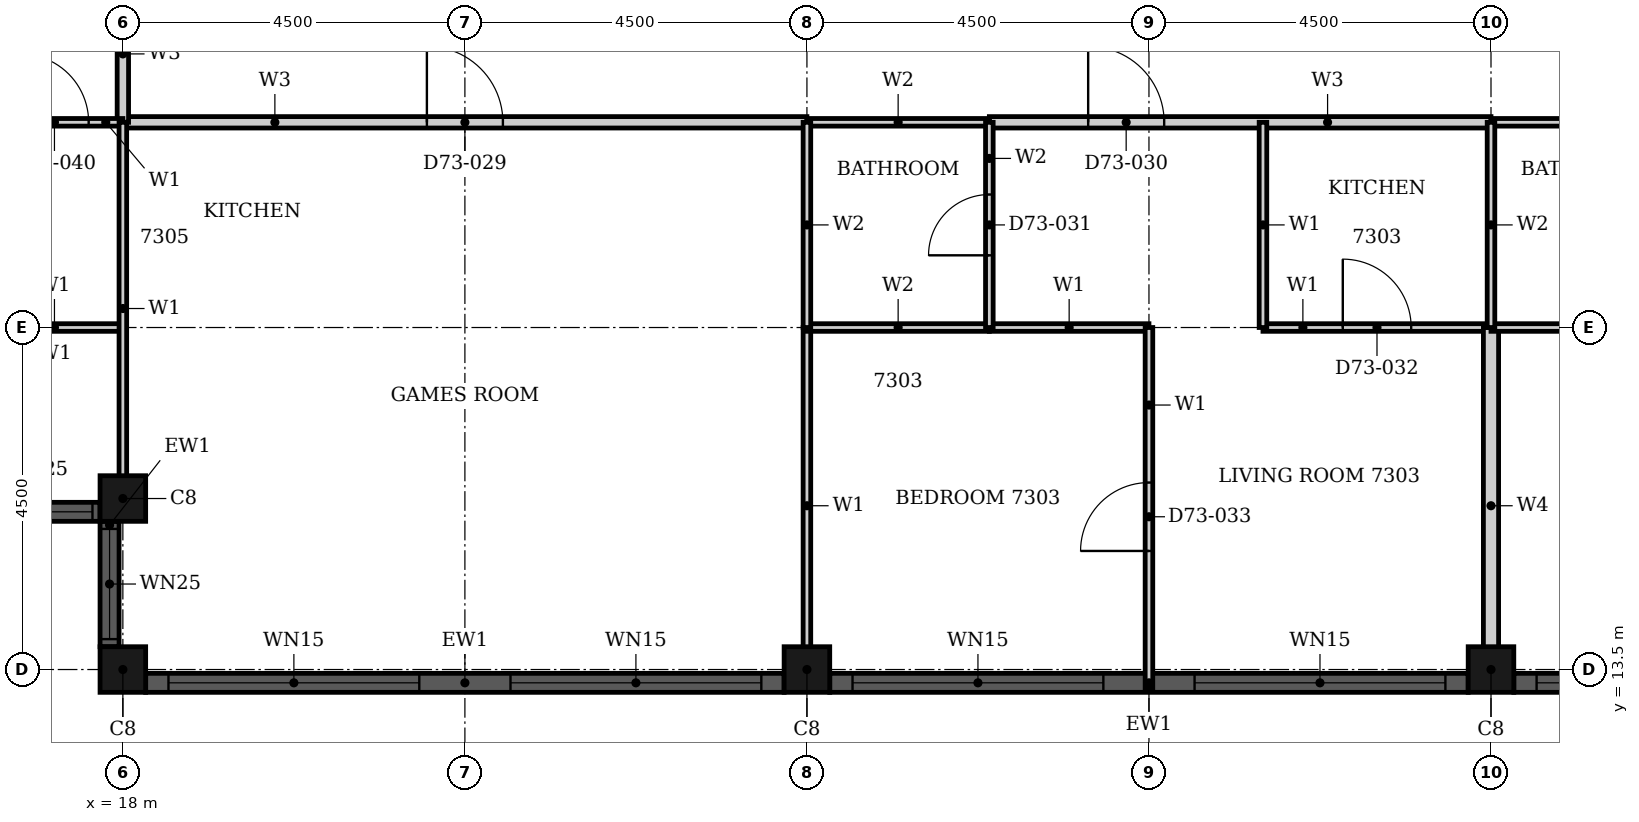
"""IFC4 building model, lengths in metres.
Left out: names, types, materials, properties, quantities, classifications, styles, units other than length and angle.
Written with IfcOpenShell. Run it as: python <this file> out.ifc"""

import sys

from ifc_helpers import new_model, si_unit, direction, frame, frame_2d, origin, origin_2d, place, context, subcontext, project, spatial, rectangle, hollow_rectangle, extrude, element, fill, save


model = new_model("IFC4")
c1 = context("Model", 3, precision=1e-05, world=origin(), true_north=direction((0.0, 1.0)))
c2 = subcontext(c1, "Body", "Model", "MODEL_VIEW")
j1 = project(units=[si_unit("LENGTHUNIT", "METRE"), si_unit("PLANEANGLEUNIT", "RADIAN")], contexts=[c1])
p1 = place(None, origin())
s1 = spatial("IfcSite", under=j1, at=p1, CompositionType="ELEMENT")
p2 = place(p1, origin())
s2 = spatial("IfcBuilding", under=s1, at=p2, CompositionType="ELEMENT")
p3 = place(p2, frame((0.0, 0.0, 287.1)))
s3 = spatial("IfcBuildingStorey", under=s2, at=p3, CompositionType="ELEMENT", Elevation=287.1)
for number, where, z_axis, x_axis in (
    (1, (18.0, 15.75, 0.0), (0.0, 0.0, 1.0), (1.0, 0.0, 0.0)),
    (2, (18.0, 13.5, 0.0), (0.0, 0.0, 1.0), (1.0, 0.0, 0.0)),
    (3, (27.0, 13.5, 0.0), (0.0, 0.0, 1.0), (1.0, 0.0, 0.0)),
    (4, (36.0, 13.5, 0.0), (0.0, 0.0, 1.0), (1.0, 0.0, 0.0)),
):
    element("IfcColumn", number, at=place(p3, frame(where, z_axis=z_axis, x_axis=x_axis)), inside=s3, PredefinedType="COLUMN", context=c2, shape_type="SweptSolid", body=[
        extrude(hollow_rectangle(XDim=0.6, YDim=0.6, WallThickness=0.02, at=origin_2d()), origin(), (0.0, 0.0, 1.0), 3.7),
    ])
p4 = place(p3, frame((16.05, 15.575, 0.0), z_axis=(0.0, 0.0, 1.0), x_axis=(1.0, 0.0, 0.0)))
e5 = element("IfcWall", 5, at=p4, inside=s3, PredefinedType="SOLIDWALL", context=c2, shape_type="SweptSolid", body=[
    extrude(rectangle(XDim=1.65, YDim=0.25, at=frame_2d((0.825, 0.0))), origin(), (0.0, 0.0, 1.0), 3.7),
])
p5 = place(p4, frame((0.1, 0.0, 0.9)))
e6 = element("IfcOpeningElement", 6, at=p5, cuts=e5, PredefinedType="OPENING", context=c2, shape_type="SweptSolid", body=[
    extrude(rectangle(XDim=1.45, YDim=1.85, at=frame_2d((0.725, 0.925))), frame((0.0, 0.135, 0.0), z_axis=(0.0, -1.0, 0.0), x_axis=(1.0, 0.0, 0.0)), (0.0, 0.0, 1.0), 0.27),
])
p6 = place(p3, frame((17.825, 15.45, 0.0), z_axis=(0.0, 0.0, 1.0), x_axis=(0.0, -1.0, 0.0)))
e7 = element("IfcWall", 7, at=p6, inside=s3, PredefinedType="SOLIDWALL", context=c2, shape_type="SweptSolid", body=[
    extrude(rectangle(XDim=1.65, YDim=0.25, at=frame_2d((0.825, 0.0))), origin(), (0.0, 0.0, 1.0), 3.7),
])
p7 = place(p6, frame((0.1, 0.0, 0.9)))
e8 = element("IfcOpeningElement", 8, at=p7, cuts=e7, PredefinedType="OPENING", context=c2, shape_type="SweptSolid", body=[
    extrude(rectangle(XDim=1.45, YDim=1.85, at=frame_2d((0.725, 0.925))), frame((0.0, 0.135, 0.0), z_axis=(0.0, -1.0, 0.0), x_axis=(1.0, 0.0, 0.0)), (0.0, 0.0, 1.0), 0.27),
])
p8 = place(p3, frame((18.3, 13.325, 0.0), z_axis=(0.0, 0.0, 1.0), x_axis=(1.0, 0.0, 0.0)))
e9 = element("IfcWall", 9, at=p8, inside=s3, PredefinedType="SOLIDWALL", context=c2, shape_type="SweptSolid", body=[
    extrude(rectangle(XDim=8.4, YDim=0.25, at=frame_2d((4.2, 0.0))), origin(), (0.0, 0.0, 1.0), 3.7),
])
p9 = place(p8, frame((0.3, 0.0, 0.45)))
e10 = element("IfcOpeningElement", 10, at=p9, cuts=e9, PredefinedType="OPENING", context=c2, shape_type="SweptSolid", body=[
    extrude(rectangle(XDim=3.3, YDim=2.3, at=frame_2d((1.65, 1.15))), frame((0.0, 0.135, 0.0), z_axis=(0.0, -1.0, 0.0), x_axis=(1.0, 0.0, 0.0)), (0.0, 0.0, 1.0), 0.27),
])
p10 = place(p8, frame((4.8, 0.0, 0.45)))
e11 = element("IfcOpeningElement", 11, at=p10, cuts=e9, PredefinedType="OPENING", context=c2, shape_type="SweptSolid", body=[
    extrude(rectangle(XDim=3.3, YDim=2.3, at=frame_2d((1.65, 1.15))), frame((0.0, 0.135, 0.0), z_axis=(0.0, -1.0, 0.0), x_axis=(1.0, 0.0, 0.0)), (0.0, 0.0, 1.0), 0.27),
])
p11 = place(p3, frame((27.3, 13.325, 0.0), z_axis=(0.0, 0.0, 1.0), x_axis=(1.0, 0.0, 0.0)))
e12 = element("IfcWall", 12, at=p11, inside=s3, PredefinedType="SOLIDWALL", context=c2, shape_type="SweptSolid", body=[
    extrude(rectangle(XDim=8.4, YDim=0.25, at=frame_2d((4.2, 0.0))), origin(), (0.0, 0.0, 1.0), 3.7),
])
p12 = place(p11, frame((0.3, 0.0, 0.45)))
e13 = element("IfcOpeningElement", 13, at=p12, cuts=e12, PredefinedType="OPENING", context=c2, shape_type="SweptSolid", body=[
    extrude(rectangle(XDim=3.3, YDim=2.3, at=frame_2d((1.65, 1.15))), frame((0.0, 0.135, 0.0), z_axis=(0.0, -1.0, 0.0), x_axis=(1.0, 0.0, 0.0)), (0.0, 0.0, 1.0), 0.27),
])
p13 = place(p11, frame((4.8, 0.0, 0.45)))
e14 = element("IfcOpeningElement", 14, at=p13, cuts=e12, PredefinedType="OPENING", context=c2, shape_type="SweptSolid", body=[
    extrude(rectangle(XDim=3.3, YDim=2.3, at=frame_2d((1.65, 1.15))), frame((0.0, 0.135, 0.0), z_axis=(0.0, -1.0, 0.0), x_axis=(1.0, 0.0, 0.0)), (0.0, 0.0, 1.0), 0.27),
])
p14 = place(p3, frame((36.3, 13.325, 0.0), z_axis=(0.0, 0.0, 1.0), x_axis=(1.0, 0.0, 0.0)))
e15 = element("IfcWall", 15, at=p14, inside=s3, PredefinedType="SOLIDWALL", context=c2, shape_type="SweptSolid", body=[
    extrude(rectangle(XDim=8.4, YDim=0.25, at=frame_2d((4.2, 0.0))), origin(), (0.0, 0.0, 1.0), 3.7),
])
p15 = place(p14, frame((0.3, 0.0, 0.45)))
e16 = element("IfcOpeningElement", 16, at=p15, cuts=e15, PredefinedType="OPENING", context=c2, shape_type="SweptSolid", body=[
    extrude(rectangle(XDim=3.3, YDim=2.3, at=frame_2d((1.65, 1.15))), frame((0.0, 0.135, 0.0), z_axis=(0.0, -1.0, 0.0), x_axis=(1.0, 0.0, 0.0)), (0.0, 0.0, 1.0), 0.27),
])
p16 = place(p14, frame((4.8, 0.0, 0.45)))
e17 = element("IfcOpeningElement", 17, at=p16, cuts=e15, PredefinedType="OPENING", context=c2, shape_type="SweptSolid", body=[
    extrude(rectangle(XDim=3.3, YDim=2.3, at=frame_2d((1.65, 1.15))), frame((0.0, 0.135, 0.0), z_axis=(0.0, -1.0, 0.0), x_axis=(1.0, 0.0, 0.0)), (0.0, 0.0, 1.0), 0.27),
])
p17 = place(p3, frame((18.0, 20.7, 0.0), z_axis=(0.0, 0.0, 1.0), x_axis=(1.0, 0.0, 0.0)))
e18 = element("IfcWall", 18, at=p17, inside=s3, PredefinedType="PARTITIONING", context=c2, shape_type="SweptSolid", body=[
    extrude(rectangle(XDim=9.0, YDim=0.15, at=frame_2d((4.5, 0.0))), origin(), (0.0, 0.0, 1.0), 3.4),
])
p18 = place(p17, frame((4.0, 0.0, 0.0)))
e19 = element("IfcOpeningElement", 19, at=p18, cuts=e18, PredefinedType="OPENING", context=c2, shape_type="SweptSolid", body=[
    extrude(rectangle(XDim=1.0, YDim=2.1, at=frame_2d((0.5, 1.05))), frame((0.0, 0.085, 0.0), z_axis=(0.0, -1.0, 0.0), x_axis=(1.0, 0.0, 0.0)), (0.0, 0.0, 1.0), 0.17),
])
p19 = place(p3, frame((29.4, 20.7, 0.0), z_axis=(0.0, 0.0, 1.0), x_axis=(1.0, 0.0, 0.0)))
e20 = element("IfcWall", 20, at=p19, inside=s3, PredefinedType="PARTITIONING", context=c2, shape_type="SweptSolid", body=[
    extrude(rectangle(XDim=6.6, YDim=0.15, at=frame_2d((3.3, 0.0))), origin(), (0.0, 0.0, 1.0), 3.4),
])
p20 = place(p19, frame((1.3, 0.0, 0.0)))
e21 = element("IfcOpeningElement", 21, at=p20, cuts=e20, PredefinedType="OPENING", context=c2, shape_type="SweptSolid", body=[
    extrude(rectangle(XDim=1.0, YDim=2.2, at=frame_2d((0.5, 1.1))), frame((0.0, 0.085, 0.0), z_axis=(0.0, -1.0, 0.0), x_axis=(1.0, 0.0, 0.0)), (0.0, 0.0, 1.0), 0.17),
])
p21 = place(p3, frame((18.0, 20.7, 0.0), z_axis=(0.0, 0.0, 1.0), x_axis=(0.0, 1.0, 0.0)))
e22 = element("IfcWall", 22, at=p21, inside=s3, PredefinedType="PARTITIONING", context=c2, shape_type="SweptSolid", body=[
    extrude(rectangle(XDim=1.8, YDim=0.15, at=frame_2d((0.9, 0.0))), origin(), (0.0, 0.0, 1.0), 3.4),
])
p22 = place(p3, frame((29.4, 18.0, 0.0), z_axis=(0.0, 0.0, 1.0), x_axis=(1.0, 0.0, 0.0)))
e23 = element("IfcWall", 23, at=p22, inside=s3, PredefinedType="PARTITIONING", context=c2, shape_type="SweptSolid", body=[
    extrude(rectangle(XDim=2.1, YDim=0.1, at=frame_2d((1.05, 0.0))), origin(), (0.0, 0.0, 1.0), 3.4),
])
p23 = place(p3, frame((33.0, 18.0, 0.0), z_axis=(0.0, 0.0, 1.0), x_axis=(1.0, 0.0, 0.0)))
e24 = element("IfcWall", 24, at=p23, inside=s3, PredefinedType="PARTITIONING", context=c2, shape_type="SweptSolid", body=[
    extrude(rectangle(XDim=3.0, YDim=0.1, at=frame_2d((1.5, 0.0))), origin(), (0.0, 0.0, 1.0), 3.4),
])
p24 = place(p23, frame((1.05, 0.0, 0.0)))
e25 = element("IfcOpeningElement", 25, at=p24, cuts=e24, PredefinedType="OPENING", context=c2, shape_type="SweptSolid", body=[
    extrude(rectangle(XDim=0.9, YDim=2.1, at=frame_2d((0.45, 1.05))), frame((0.0, 0.06, 0.0), z_axis=(0.0, -1.0, 0.0), x_axis=(1.0, 0.0, 0.0)), (0.0, 0.0, 1.0), 0.12),
])
p25 = place(p3, frame((16.2, 18.0, 0.0), z_axis=(0.0, 0.0, 1.0), x_axis=(1.0, 0.0, 0.0)))
e26 = element("IfcWall", 26, at=p25, inside=s3, PredefinedType="PARTITIONING", context=c2, shape_type="SweptSolid", body=[
    extrude(rectangle(XDim=1.8, YDim=0.1, at=frame_2d((0.9, 0.0))), origin(), (0.0, 0.0, 1.0), 3.4),
])
p26 = place(p3, frame((16.2, 20.7, 0.0), z_axis=(0.0, 0.0, 1.0), x_axis=(1.0, 0.0, 0.0)))
e27 = element("IfcWall", 27, at=p26, inside=s3, PredefinedType="PARTITIONING", context=c2, shape_type="SweptSolid", body=[
    extrude(rectangle(XDim=1.8, YDim=0.1, at=frame_2d((0.9, 0.0))), origin(), (0.0, 0.0, 1.0), 3.4),
])
p27 = place(p26, frame((0.45, 0.0, 0.0)))
e28 = element("IfcOpeningElement", 28, at=p27, cuts=e27, PredefinedType="OPENING", context=c2, shape_type="SweptSolid", body=[
    extrude(rectangle(XDim=0.9, YDim=2.1, at=frame_2d((0.45, 1.05))), frame((0.0, 0.06, 0.0), z_axis=(0.0, -1.0, 0.0), x_axis=(1.0, 0.0, 0.0)), (0.0, 0.0, 1.0), 0.12),
])
p28 = place(p3, frame((18.0, 15.8, 0.0), z_axis=(0.0, 0.0, 1.0), x_axis=(0.0, 1.0, 0.0)))
e29 = element("IfcWall", 29, at=p28, inside=s3, PredefinedType="PARTITIONING", context=c2, shape_type="SweptSolid", body=[
    extrude(rectangle(XDim=4.9, YDim=0.1, at=frame_2d((2.45, 0.0))), origin(), (0.0, 0.0, 1.0), 3.4),
])
p29 = place(p3, frame((27.0, 13.31, 0.0), z_axis=(0.0, 0.0, 1.0), x_axis=(0.0, 1.0, 0.0)))
e30 = element("IfcWall", 30, at=p29, inside=s3, PredefinedType="PARTITIONING", context=c2, shape_type="SweptSolid", body=[
    extrude(rectangle(XDim=4.69, YDim=0.1, at=frame_2d((2.345, 0.0))), origin(), (0.0, 0.0, 1.0), 3.4),
])
p30 = place(p3, frame((31.5, 13.26, 0.0), z_axis=(0.0, 0.0, 1.0), x_axis=(0.0, 1.0, 0.0)))
e31 = element("IfcWall", 31, at=p30, inside=s3, PredefinedType="PARTITIONING", context=c2, shape_type="SweptSolid", body=[
    extrude(rectangle(XDim=4.74, YDim=0.1, at=frame_2d((2.37, 0.0))), origin(), (0.0, 0.0, 1.0), 3.4),
])
p31 = place(p30, frame((1.8, 0.0, 0.0)))
e32 = element("IfcOpeningElement", 32, at=p31, cuts=e31, PredefinedType="OPENING", context=c2, shape_type="SweptSolid", body=[
    extrude(rectangle(XDim=0.9, YDim=2.1, at=frame_2d((0.45, 1.05))), frame((0.0, 0.06, 0.0), z_axis=(0.0, -1.0, 0.0), x_axis=(1.0, 0.0, 0.0)), (0.0, 0.0, 1.0), 0.12),
])
p32 = place(p3, frame((33.0, 18.0, 0.0), z_axis=(0.0, 0.0, 1.0), x_axis=(0.0, 1.0, 0.0)))
e33 = element("IfcWall", 33, at=p32, inside=s3, PredefinedType="PARTITIONING", context=c2, shape_type="SweptSolid", body=[
    extrude(rectangle(XDim=2.7, YDim=0.1, at=frame_2d((1.35, 0.0))), origin(), (0.0, 0.0, 1.0), 3.4),
])
p33 = place(p3, frame((36.0, 13.31, 0.0), z_axis=(0.0, 0.0, 1.0), x_axis=(0.0, 1.0, 0.0)))
e34 = element("IfcWall", 34, at=p33, inside=s3, PredefinedType="PARTITIONING", context=c2, shape_type="SweptSolid", body=[
    extrude(rectangle(XDim=4.69, YDim=0.2, at=frame_2d((2.345, 0.0))), origin(), (0.0, 0.0, 1.0), 3.4),
])
for number, where, z_axis, x_axis in (
    (35, (27.0, 18.0, 0.0), (0.0, 0.0, 1.0), (1.0, 0.0, 0.0)),
    (36, (36.0, 18.0, 0.0), (0.0, 0.0, 1.0), (1.0, 0.0, 0.0)),
    (37, (27.0, 20.7, 0.0), (0.0, 0.0, 1.0), (1.0, 0.0, 0.0)),
    (38, (36.0, 20.7, 0.0), (0.0, 0.0, 1.0), (1.0, 0.0, 0.0)),
):
    element("IfcWall", number, at=place(p3, frame(where, z_axis=z_axis, x_axis=x_axis)), inside=s3, PredefinedType="PARTITIONING", context=c2, shape_type="SweptSolid", body=[
        extrude(rectangle(XDim=2.4, YDim=0.1, at=frame_2d((1.2, 0.0))), origin(), (0.0, 0.0, 1.0), 3.4),
    ])
p34 = place(p3, frame((27.0, 18.0, 0.0), z_axis=(0.0, 0.0, 1.0), x_axis=(0.0, 1.0, 0.0)))
e39 = element("IfcWall", 39, at=p34, inside=s3, PredefinedType="PARTITIONING", context=c2, shape_type="SweptSolid", body=[
    extrude(rectangle(XDim=2.7, YDim=0.1, at=frame_2d((1.35, 0.0))), origin(), (0.0, 0.0, 1.0), 3.4),
])
p35 = place(p3, frame((29.4, 18.0, 0.0), z_axis=(0.0, 0.0, 1.0), x_axis=(0.0, 1.0, 0.0)))
e40 = element("IfcWall", 40, at=p35, inside=s3, PredefinedType="PARTITIONING", context=c2, shape_type="SweptSolid", body=[
    extrude(rectangle(XDim=2.7, YDim=0.1, at=frame_2d((1.35, 0.0))), origin(), (0.0, 0.0, 1.0), 3.4),
])
p36 = place(p35, frame((0.95, 0.0, 0.0)))
e41 = element("IfcOpeningElement", 41, at=p36, cuts=e40, PredefinedType="OPENING", context=c2, shape_type="SweptSolid", body=[
    extrude(rectangle(XDim=0.8, YDim=2.1, at=frame_2d((0.4, 1.05))), frame((0.0, 0.06, 0.0), z_axis=(0.0, -1.0, 0.0), x_axis=(1.0, 0.0, 0.0)), (0.0, 0.0, 1.0), 0.12),
])
p37 = place(p3, frame((36.0, 18.0, 0.0), z_axis=(0.0, 0.0, 1.0), x_axis=(0.0, 1.0, 0.0)))
e42 = element("IfcWall", 42, at=p37, inside=s3, PredefinedType="PARTITIONING", context=c2, shape_type="SweptSolid", body=[
    extrude(rectangle(XDim=2.7, YDim=0.1, at=frame_2d((1.35, 0.0))), origin(), (0.0, 0.0, 1.0), 3.4),
])
p38 = place(p5, origin())
e43 = element("IfcWindow", 43, at=p38, inside=s3, PartitioningType="SINGLE_PANEL", PredefinedType="WINDOW", context=c2, shape_type="SweptSolid", body=[
    extrude(rectangle(XDim=1.45, YDim=1.85, at=frame_2d((0.725, 0.925))), frame((0.0, 0.03, 0.0), z_axis=(0.0, -1.0, 0.0), x_axis=(1.0, 0.0, 0.0)), (0.0, 0.0, 1.0), 0.06),
])
fill(e6, e43)
p39 = place(p7, origin())
e44 = element("IfcWindow", 44, at=p39, inside=s3, PartitioningType="SINGLE_PANEL", PredefinedType="WINDOW", context=c2, shape_type="SweptSolid", body=[
    extrude(rectangle(XDim=1.45, YDim=1.85, at=frame_2d((0.725, 0.925))), frame((0.0, 0.03, 0.0), z_axis=(0.0, -1.0, 0.0), x_axis=(1.0, 0.0, 0.0)), (0.0, 0.0, 1.0), 0.06),
])
fill(e8, e44)
p40 = place(p9, origin())
e45 = element("IfcWindow", 45, at=p40, inside=s3, PartitioningType="SINGLE_PANEL", PredefinedType="WINDOW", context=c2, shape_type="SweptSolid", body=[
    extrude(rectangle(XDim=3.3, YDim=2.3, at=frame_2d((1.65, 1.15))), frame((0.0, 0.03, 0.0), z_axis=(0.0, -1.0, 0.0), x_axis=(1.0, 0.0, 0.0)), (0.0, 0.0, 1.0), 0.06),
])
fill(e10, e45)
p41 = place(p10, origin())
e46 = element("IfcWindow", 46, at=p41, inside=s3, PartitioningType="SINGLE_PANEL", PredefinedType="WINDOW", context=c2, shape_type="SweptSolid", body=[
    extrude(rectangle(XDim=3.3, YDim=2.3, at=frame_2d((1.65, 1.15))), frame((0.0, 0.03, 0.0), z_axis=(0.0, -1.0, 0.0), x_axis=(1.0, 0.0, 0.0)), (0.0, 0.0, 1.0), 0.06),
])
fill(e11, e46)
p42 = place(p12, origin())
e47 = element("IfcWindow", 47, at=p42, inside=s3, PartitioningType="SINGLE_PANEL", PredefinedType="WINDOW", context=c2, shape_type="SweptSolid", body=[
    extrude(rectangle(XDim=3.3, YDim=2.3, at=frame_2d((1.65, 1.15))), frame((0.0, 0.03, 0.0), z_axis=(0.0, -1.0, 0.0), x_axis=(1.0, 0.0, 0.0)), (0.0, 0.0, 1.0), 0.06),
])
fill(e13, e47)
p43 = place(p13, origin())
e48 = element("IfcWindow", 48, at=p43, inside=s3, PartitioningType="SINGLE_PANEL", PredefinedType="WINDOW", context=c2, shape_type="SweptSolid", body=[
    extrude(rectangle(XDim=3.3, YDim=2.3, at=frame_2d((1.65, 1.15))), frame((0.0, 0.03, 0.0), z_axis=(0.0, -1.0, 0.0), x_axis=(1.0, 0.0, 0.0)), (0.0, 0.0, 1.0), 0.06),
])
fill(e14, e48)
p44 = place(p15, origin())
e49 = element("IfcWindow", 49, at=p44, inside=s3, PartitioningType="SINGLE_PANEL", PredefinedType="WINDOW", context=c2, shape_type="SweptSolid", body=[
    extrude(rectangle(XDim=3.3, YDim=2.3, at=frame_2d((1.65, 1.15))), frame((0.0, 0.03, 0.0), z_axis=(0.0, -1.0, 0.0), x_axis=(1.0, 0.0, 0.0)), (0.0, 0.0, 1.0), 0.06),
])
fill(e16, e49)
p45 = place(p18, origin())
e50 = element("IfcDoor", 50, at=p45, inside=s3, OperationType="SINGLE_SWING_LEFT", PredefinedType="DOOR", context=c2, shape_type="SweptSolid", body=[
    extrude(rectangle(XDim=1.0, YDim=2.1, at=frame_2d((0.5, 1.05))), frame((0.0, 0.025, 0.0), z_axis=(0.0, -1.0, 0.0), x_axis=(1.0, 0.0, 0.0)), (0.0, 0.0, 1.0), 0.05),
])
fill(e19, e50)
p46 = place(p20, origin())
e51 = element("IfcDoor", 51, at=p46, inside=s3, OperationType="SINGLE_SWING_RIGHT", PredefinedType="DOOR", context=c2, shape_type="SweptSolid", body=[
    extrude(rectangle(XDim=1.0, YDim=2.2, at=frame_2d((0.5, 1.1))), frame((0.0, 0.025, 0.0), z_axis=(0.0, -1.0, 0.0), x_axis=(1.0, 0.0, 0.0)), (0.0, 0.0, 1.0), 0.05),
])
fill(e21, e51)
p47 = place(p36, origin())
e52 = element("IfcDoor", 52, at=p47, inside=s3, OperationType="SINGLE_SWING_LEFT", PredefinedType="DOOR", context=c2, shape_type="SweptSolid", body=[
    extrude(rectangle(XDim=0.8, YDim=2.1, at=frame_2d((0.4, 1.05))), frame((0.0, 0.025, 0.0), z_axis=(0.0, -1.0, 0.0), x_axis=(1.0, 0.0, 0.0)), (0.0, 0.0, 1.0), 0.05),
])
fill(e41, e52)
p48 = place(p24, origin())
e53 = element("IfcDoor", 53, at=p48, inside=s3, OperationType="SINGLE_SWING_LEFT", PredefinedType="DOOR", context=c2, shape_type="SweptSolid", body=[
    extrude(rectangle(XDim=0.9, YDim=2.1, at=frame_2d((0.45, 1.05))), frame((0.0, 0.025, 0.0), z_axis=(0.0, -1.0, 0.0), x_axis=(1.0, 0.0, 0.0)), (0.0, 0.0, 1.0), 0.05),
])
fill(e25, e53)
p49 = place(p31, origin())
e54 = element("IfcDoor", 54, at=p49, inside=s3, OperationType="SINGLE_SWING_LEFT", PredefinedType="DOOR", context=c2, shape_type="SweptSolid", body=[
    extrude(rectangle(XDim=0.9, YDim=2.1, at=frame_2d((0.45, 1.05))), frame((0.0, 0.025, 0.0), z_axis=(0.0, -1.0, 0.0), x_axis=(1.0, 0.0, 0.0)), (0.0, 0.0, 1.0), 0.05),
])
fill(e32, e54)
p50 = place(p27, origin())
e55 = element("IfcDoor", 55, at=p50, inside=s3, OperationType="SINGLE_SWING_LEFT", PredefinedType="DOOR", context=c2, shape_type="SweptSolid", body=[
    extrude(rectangle(XDim=0.9, YDim=2.1, at=frame_2d((0.45, 1.05))), frame((0.0, 0.025, 0.0), z_axis=(0.0, -1.0, 0.0), x_axis=(1.0, 0.0, 0.0)), (0.0, 0.0, 1.0), 0.05),
])
fill(e28, e55)
save(model, sys.argv[1])
